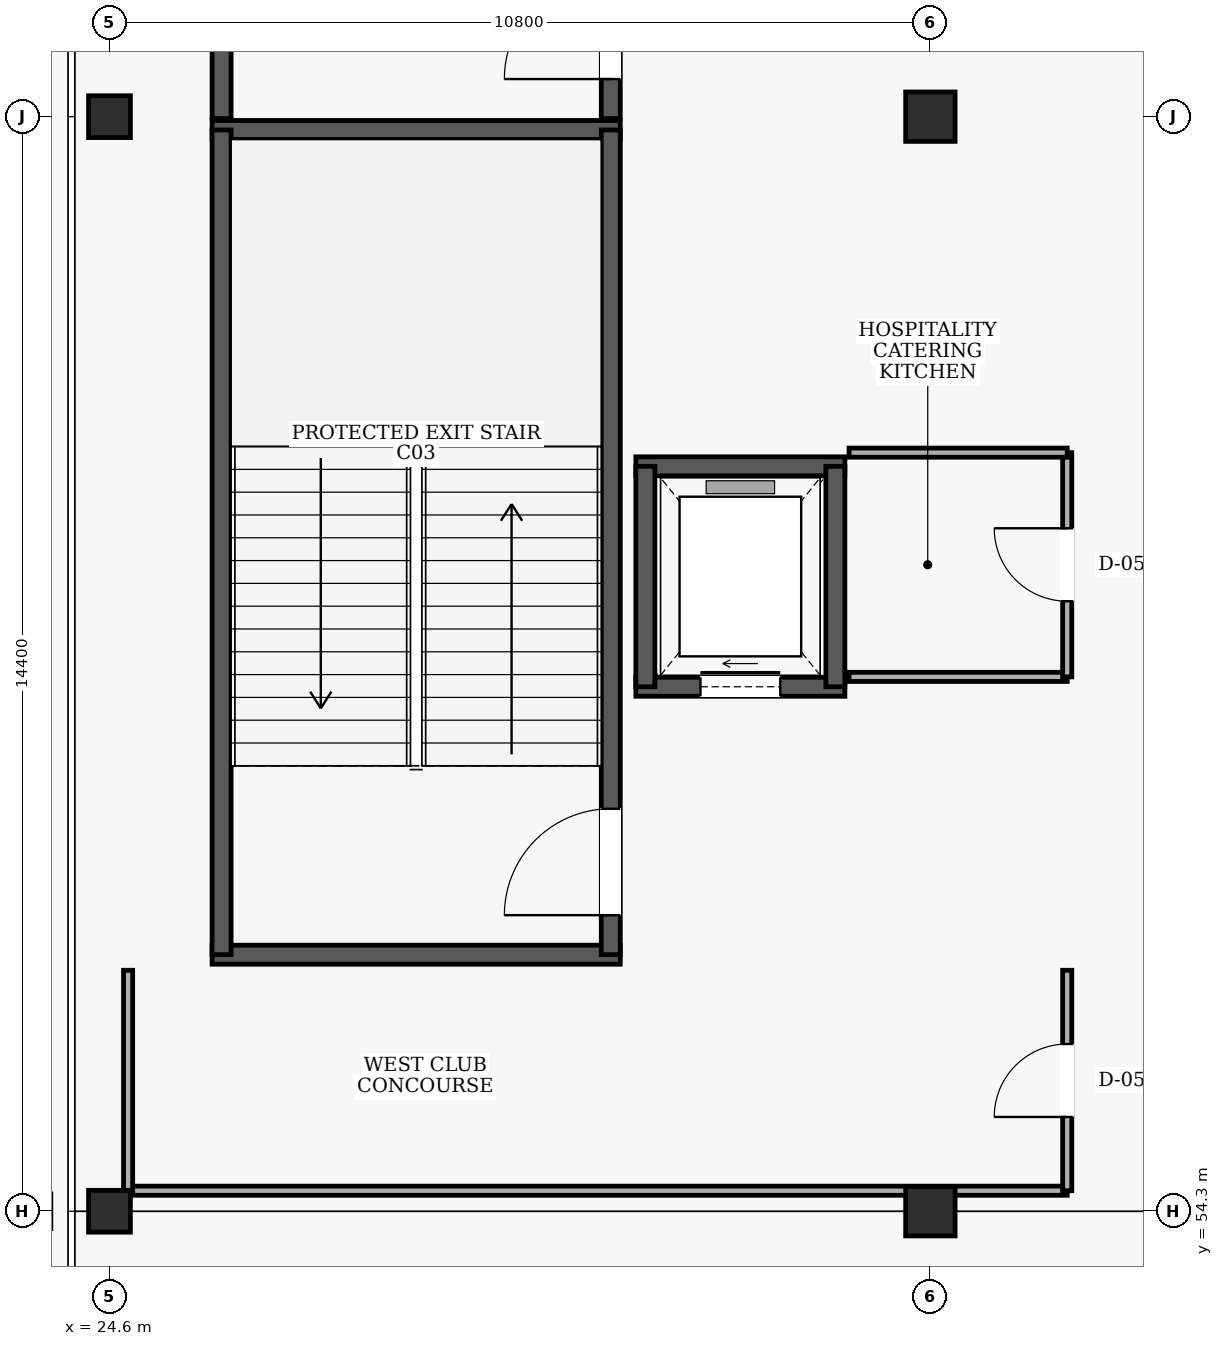
"""IFC4 building model, lengths in metres.
Left out: names, types, materials, properties, quantities, classifications, styles, units other than length and angle.
Written with IfcOpenShell. Run it as: python <this file> out.ifc"""

import sys

from ifc_helpers import new_model, si_unit, direction, frame, frame_2d, origin, origin_2d, place, context, subcontext, project, spatial, rectangle, extrude, element, fill, save


model = new_model("IFC4")
c1 = context("Model", 3, precision=1e-05, world=origin(), true_north=direction((0.0, 1.0)))
c2 = subcontext(c1, "Body", "Model", "MODEL_VIEW")
j1 = project(units=[si_unit("LENGTHUNIT", "METRE"), si_unit("PLANEANGLEUNIT", "RADIAN")], contexts=[c1])
p1 = place(None, origin())
s1 = spatial("IfcSite", under=j1, at=p1, CompositionType="ELEMENT")
p2 = place(p1, origin())
s2 = spatial("IfcBuilding", under=s1, at=p2, CompositionType="ELEMENT")
p3 = place(p2, frame((0.0, 0.0, 10.2)))
s3 = spatial("IfcBuildingStorey", under=s2, at=p3, CompositionType="ELEMENT", Elevation=10.2)
for number, where, z_axis, x_axis in (
    (1, (24.6, 54.3, 0.0), (0.0, 0.0, 1.0), (1.0, 0.0, 0.0)),
    (2, (24.6, 68.7, 0.0), (0.0, 0.0, 1.0), (1.0, 0.0, 0.0)),
):
    element("IfcColumn", number, at=place(p3, frame(where, z_axis=z_axis, x_axis=x_axis)), inside=s3, PredefinedType="COLUMN", context=c2, shape_type="SweptSolid", body=[
        extrude(rectangle(XDim=0.55, YDim=0.55, at=origin_2d()), origin(), (0.0, 0.0, 1.0), 4.8),
    ])
for number, where, z_axis, x_axis in (
    (3, (35.4, 54.3, 0.0), (0.0, 0.0, 1.0), (1.0, 0.0, 0.0)),
    (4, (35.4, 68.7, 0.0), (0.0, 0.0, 1.0), (1.0, 0.0, 0.0)),
):
    element("IfcColumn", number, at=place(p3, frame(where, z_axis=z_axis, x_axis=x_axis)), inside=s3, PredefinedType="COLUMN", context=c2, shape_type="SweptSolid", body=[
        extrude(rectangle(XDim=0.65, YDim=0.65, at=origin_2d()), origin(), (0.0, 0.0, 1.0), 4.8),
    ])
for number, where, z_axis, x_axis in (
    (5, (25.95, 57.675, 0.0), (0.0, 0.0, 1.0), (1.0, 0.0, 0.0)),
    (6, (31.32, 68.525, 0.0), (0.0, 0.0, 1.0), (-1.0, 0.0, 0.0)),
):
    element("IfcWall", number, at=place(p3, frame(where, z_axis=z_axis, x_axis=x_axis)), inside=s3, PredefinedType="SHEAR", context=c2, shape_type="SweptSolid", body=[
        extrude(rectangle(XDim=5.37, YDim=0.25, at=frame_2d((2.685, 0.0))), origin(), (0.0, 0.0, 1.0), 4.48),
    ])
p4 = place(p3, frame((26.075, 57.675, 0.0), z_axis=(0.0, 0.0, 1.0), x_axis=(0.0, 1.0, 0.0)))
e7 = element("IfcWall", 7, at=p4, inside=s3, PredefinedType="SHEAR", context=c2, shape_type="SweptSolid", body=[
    extrude(rectangle(XDim=10.85, YDim=0.25, at=frame_2d((5.425, 0.0))), origin(), (0.0, 0.0, 1.0), 4.48),
])
p5 = place(p3, frame((31.195, 57.675, 0.0), z_axis=(0.0, 0.0, 1.0), x_axis=(0.0, 1.0, 0.0)))
e8 = element("IfcWall", 8, at=p5, inside=s3, PredefinedType="SHEAR", context=c2, shape_type="SweptSolid", body=[
    extrude(rectangle(XDim=10.85, YDim=0.25, at=frame_2d((5.425, 0.0))), origin(), (0.0, 0.0, 1.0), 4.48),
])
p6 = place(p5, frame((0.52, 0.0, 0.0)))
e9 = element("IfcOpeningElement", 9, at=p6, cuts=e8, PredefinedType="OPENING", context=c2, shape_type="SweptSolid", body=[
    extrude(rectangle(XDim=1.4, YDim=2.15, at=frame_2d((0.7, 1.075))), frame((0.0, 0.135, 0.0), z_axis=(0.0, -1.0, 0.0), x_axis=(1.0, 0.0, 0.0)), (0.0, 0.0, 1.0), 0.27),
])
p7 = place(p3, frame((26.075, 68.675, 0.0), z_axis=(0.0, 0.0, 1.0), x_axis=(0.0, 1.0, 0.0)))
e10 = element("IfcWall", 10, at=p7, inside=s3, PredefinedType="SHEAR", context=c2, shape_type="SweptSolid", body=[
    extrude(rectangle(XDim=10.85, YDim=0.25, at=frame_2d((5.425, 0.0))), origin(), (0.0, 0.0, 1.0), 4.48),
])
p8 = place(p3, frame((31.195, 68.675, 0.0), z_axis=(0.0, 0.0, 1.0), x_axis=(0.0, 1.0, 0.0)))
e11 = element("IfcWall", 11, at=p8, inside=s3, PredefinedType="SHEAR", context=c2, shape_type="SweptSolid", body=[
    extrude(rectangle(XDim=10.85, YDim=0.25, at=frame_2d((5.425, 0.0))), origin(), (0.0, 0.0, 1.0), 4.48),
])
p9 = place(p8, frame((0.52, 0.0, 0.0)))
e12 = element("IfcOpeningElement", 12, at=p9, cuts=e11, PredefinedType="OPENING", context=c2, shape_type="SweptSolid", body=[
    extrude(rectangle(XDim=1.4, YDim=2.15, at=frame_2d((0.7, 1.075))), frame((0.0, 0.135, 0.0), z_axis=(0.0, -1.0, 0.0), x_axis=(1.0, 0.0, 0.0)), (0.0, 0.0, 1.0), 0.27),
])
p10 = place(p3, frame((31.525, 61.2, 0.0), z_axis=(0.0, 0.0, 1.0), x_axis=(1.0, 0.0, 0.0)))
e13 = element("IfcWall", 13, at=p10, inside=s3, PredefinedType="SHEAR", context=c2, shape_type="SweptSolid", body=[
    extrude(rectangle(XDim=2.75, YDim=0.25, at=frame_2d((1.375, 0.0))), origin(), (0.0, 0.0, 1.0), 4.48),
])
p11 = place(p10, frame((0.85, 0.0, 0.0)))
e14 = element("IfcOpeningElement", 14, at=p11, cuts=e13, PredefinedType="OPENING", context=c2, shape_type="SweptSolid", body=[
    extrude(rectangle(XDim=1.05, YDim=2.15, at=frame_2d((0.525, 1.075))), frame((0.0, 0.135, 0.0), z_axis=(0.0, -1.0, 0.0), x_axis=(1.0, 0.0, 0.0)), (0.0, 0.0, 1.0), 0.27),
])
p12 = place(p3, frame((34.275, 64.1, 0.0), z_axis=(0.0, 0.0, 1.0), x_axis=(-1.0, 0.0, 0.0)))
e15 = element("IfcWall", 15, at=p12, inside=s3, PredefinedType="SHEAR", context=c2, shape_type="SweptSolid", body=[
    extrude(rectangle(XDim=2.75, YDim=0.25, at=frame_2d((1.375, 0.0))), origin(), (0.0, 0.0, 1.0), 4.48),
])
for number, where, z_axis, x_axis in (
    (16, (31.65, 64.1, 0.0), (0.0, 0.0, 1.0), (0.0, -1.0, 0.0)),
    (17, (34.15, 61.2, 0.0), (0.0, 0.0, 1.0), (0.0, 1.0, 0.0)),
):
    element("IfcWall", number, at=place(p3, frame(where, z_axis=z_axis, x_axis=x_axis)), inside=s3, PredefinedType="SHEAR", context=c2, shape_type="SweptSolid", body=[
        extrude(rectangle(XDim=2.9, YDim=0.25, at=frame_2d((1.45, 0.0))), origin(), (0.0, 0.0, 1.0), 4.48),
    ])
p13 = place(p3, frame((24.845, 54.57, 0.0), z_axis=(0.0, 0.0, 1.0), x_axis=(1.0, 0.0, 0.0)))
e18 = element("IfcWall", 18, at=p13, inside=s3, PredefinedType="PARTITIONING", context=c2, shape_type="SweptSolid", body=[
    extrude(rectangle(XDim=12.355, YDim=0.12, at=frame_2d((6.177, 0.0))), origin(), (0.0, 0.0, 1.0), 3.76),
])
p14 = place(p3, frame((37.2, 54.57, 0.0), z_axis=(0.0, 0.0, 1.0), x_axis=(0.0, 1.0, 0.0)))
e19 = element("IfcWall", 19, at=p14, inside=s3, PredefinedType="PARTITIONING", context=c2, shape_type="SweptSolid", body=[
    extrude(rectangle(XDim=2.9, YDim=0.12, at=frame_2d((1.45, 0.0))), origin(), (0.0, 0.0, 1.0), 4.48),
])
p15 = place(p14, frame((0.97, 0.0, 0.0)))
e20 = element("IfcOpeningElement", 20, at=p15, cuts=e19, PredefinedType="OPENING", context=c2, shape_type="SweptSolid", body=[
    extrude(rectangle(XDim=0.96, YDim=2.1, at=frame_2d((0.48, 1.05))), frame((0.0, 0.07, 0.0), z_axis=(0.0, -1.0, 0.0), x_axis=(1.0, 0.0, 0.0)), (0.0, 0.0, 1.0), 0.14),
])
p16 = place(p3, frame((24.845, 57.47, 0.0), z_axis=(0.0, 0.0, 1.0), x_axis=(0.0, -1.0, 0.0)))
e21 = element("IfcWall", 21, at=p16, inside=s3, PredefinedType="PARTITIONING", context=c2, shape_type="SweptSolid", body=[
    extrude(rectangle(XDim=2.9, YDim=0.12, at=frame_2d((1.45, 0.0))), origin(), (0.0, 0.0, 1.0), 3.56),
])
p17 = place(p3, frame((34.33, 61.33, 0.0), z_axis=(0.0, 0.0, 1.0), x_axis=(1.0, 0.0, 0.0)))
e22 = element("IfcWall", 22, at=p17, inside=s3, PredefinedType="PARTITIONING", context=c2, shape_type="SweptSolid", body=[
    extrude(rectangle(XDim=2.87, YDim=0.12, at=frame_2d((1.435, 0.0))), origin(), (0.0, 0.0, 1.0), 4.48),
])
p18 = place(p3, frame((37.2, 61.33, 0.0), z_axis=(0.0, 0.0, 1.0), x_axis=(0.0, 1.0, 0.0)))
e23 = element("IfcWall", 23, at=p18, inside=s3, PredefinedType="PARTITIONING", context=c2, shape_type="SweptSolid", body=[
    extrude(rectangle(XDim=2.95, YDim=0.12, at=frame_2d((1.475, 0.0))), origin(), (0.0, 0.0, 1.0), 4.48),
])
p19 = place(p18, frame((0.995, 0.0, 0.0)))
e24 = element("IfcOpeningElement", 24, at=p19, cuts=e23, PredefinedType="OPENING", context=c2, shape_type="SweptSolid", body=[
    extrude(rectangle(XDim=0.96, YDim=2.1, at=frame_2d((0.48, 1.05))), frame((0.0, 0.07, 0.0), z_axis=(0.0, -1.0, 0.0), x_axis=(1.0, 0.0, 0.0)), (0.0, 0.0, 1.0), 0.14),
])
p20 = place(p3, frame((37.2, 64.28, 0.0), z_axis=(0.0, 0.0, 1.0), x_axis=(-1.0, 0.0, 0.0)))
e25 = element("IfcWall", 25, at=p20, inside=s3, PredefinedType="PARTITIONING", context=c2, shape_type="SweptSolid", body=[
    extrude(rectangle(XDim=2.87, YDim=0.12, at=frame_2d((1.435, 0.0))), origin(), (0.0, 0.0, 1.0), 4.48),
])
p21 = place(p6, origin())
e26 = element("IfcDoor", 26, at=p21, inside=s3, OperationType="SINGLE_SWING_LEFT", PredefinedType="DOOR", context=c2, shape_type="SweptSolid", body=[
    extrude(rectangle(XDim=1.4, YDim=2.15, at=frame_2d((0.7, 1.075))), frame((0.0, 0.025, 0.0), z_axis=(0.0, -1.0, 0.0), x_axis=(1.0, 0.0, 0.0)), (0.0, 0.0, 1.0), 0.05),
])
fill(e9, e26)
p22 = place(p9, origin())
e27 = element("IfcDoor", 27, at=p22, inside=s3, OperationType="SINGLE_SWING_LEFT", PredefinedType="DOOR", context=c2, shape_type="SweptSolid", body=[
    extrude(rectangle(XDim=1.4, YDim=2.15, at=frame_2d((0.7, 1.075))), frame((0.0, 0.025, 0.0), z_axis=(0.0, -1.0, 0.0), x_axis=(1.0, 0.0, 0.0)), (0.0, 0.0, 1.0), 0.05),
])
fill(e12, e27)
p23 = place(p11, origin())
e28 = element("IfcDoor", 28, at=p23, inside=s3, OperationType="SLIDING_TO_RIGHT", PredefinedType="DOOR", context=c2, shape_type="SweptSolid", body=[
    extrude(rectangle(XDim=1.05, YDim=2.15, at=frame_2d((0.525, 1.075))), frame((0.0, 0.025, 0.0), z_axis=(0.0, -1.0, 0.0), x_axis=(1.0, 0.0, 0.0)), (0.0, 0.0, 1.0), 0.05),
])
fill(e14, e28)
p24 = place(p15, origin())
e29 = element("IfcDoor", 29, at=p24, inside=s3, OperationType="SINGLE_SWING_LEFT", PredefinedType="DOOR", context=c2, shape_type="SweptSolid", body=[
    extrude(rectangle(XDim=0.96, YDim=2.1, at=frame_2d((0.48, 1.05))), frame((0.0, 0.025, 0.0), z_axis=(0.0, -1.0, 0.0), x_axis=(1.0, 0.0, 0.0)), (0.0, 0.0, 1.0), 0.05),
])
fill(e20, e29)
p25 = place(p19, origin())
e30 = element("IfcDoor", 30, at=p25, inside=s3, OperationType="SINGLE_SWING_RIGHT", PredefinedType="DOOR", context=c2, shape_type="SweptSolid", body=[
    extrude(rectangle(XDim=0.96, YDim=2.1, at=frame_2d((0.48, 1.05))), frame((0.0, 0.025, 0.0), z_axis=(0.0, -1.0, 0.0), x_axis=(1.0, 0.0, 0.0)), (0.0, 0.0, 1.0), 0.05),
])
fill(e24, e30)
save(model, sys.argv[1])
